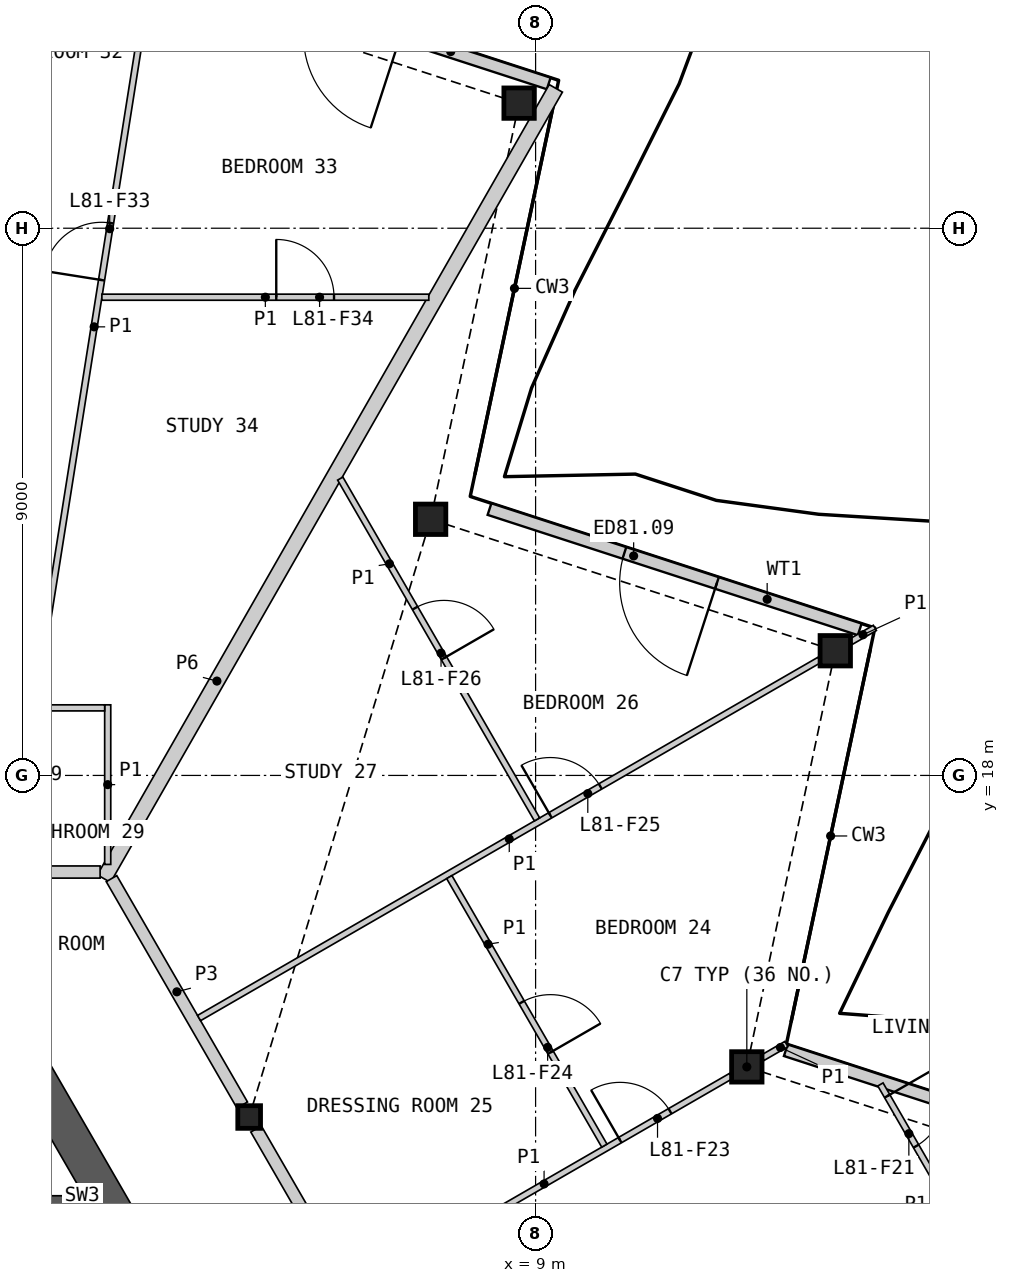
"""IFC4 building model, lengths in metres.
Left out: names, types, materials, properties, quantities, classifications, styles, units other than length and angle.
Written with IfcOpenShell. Run it as: python <this file> out.ifc"""

import sys

from ifc_helpers import new_model, si_unit, direction, frame, frame_2d, origin, origin_2d, place, context, subcontext, project, spatial, polyline, rectangle, hollow_rectangle, i_section, outline, extrude, element, fill, save


model = new_model("IFC4")
c1 = context("Model", 3, precision=1e-05, world=origin(), true_north=direction((0.0, 1.0)))
c2 = subcontext(c1, "Body", "Model", "MODEL_VIEW")
j1 = project(units=[si_unit("LENGTHUNIT", "METRE"), si_unit("PLANEANGLEUNIT", "RADIAN")], contexts=[c1])
p1 = place(None, origin())
s1 = spatial("IfcSite", under=j1, at=p1, CompositionType="ELEMENT")
p2 = place(p1, origin())
s2 = spatial("IfcBuilding", under=s1, at=p2, CompositionType="ELEMENT")
p3 = place(p2, frame((0.0, 0.0, 364.4)))
s3 = spatial("IfcBuildingStorey", under=s2, at=p3, CompositionType="ELEMENT", Elevation=364.4)
for number, where, z_axis, x_axis in (
    (1, (12.474, 13.206, 0.0), (0.0, 0.0, 1.0), (1.0, 0.0, 0.0)),
    (2, (13.929, 20.051, 0.0), (0.0, 0.0, 1.0), (1.0, 0.0, 0.0)),
    (3, (7.274, 22.213, 0.0), (0.0, 0.0, 1.0), (1.0, 0.0, 0.0)),
    (4, (8.729, 29.057, 0.0), (0.0, 0.0, 1.0), (1.0, 0.0, 0.0)),
):
    element("IfcColumn", number, at=place(p3, frame(where, z_axis=z_axis, x_axis=x_axis)), inside=s3, PredefinedType="COLUMN", context=c2, shape_type="SweptSolid", body=[
        extrude(hollow_rectangle(XDim=0.5, YDim=0.5, WallThickness=0.03, at=origin_2d()), origin(), (0.0, 0.0, 1.0), 3.4),
    ])
p4 = place(p3, frame((4.289, 12.382, 0.0), z_axis=(0.0, 0.0, 1.0), x_axis=(1.0, 0.0, 0.0)))
e5 = element("IfcColumn", 5, at=p4, inside=s3, PredefinedType="COLUMN", context=c2, shape_type="SweptSolid", body=[
    extrude(i_section(OverallWidth=0.374, OverallDepth=0.372, WebThickness=0.016, FlangeThickness=0.026, at=origin_2d()), origin(), (0.0, 0.0, 1.0), 3.4),
])
p5 = place(p3, frame((19.467, 11.416, 0.0), z_axis=(0.0, 0.0, 1.0), x_axis=(-0.951057706878, 0.309013330114, 0.0)))
e6 = element("IfcWall", 6, at=p5, inside=s3, PredefinedType="SOLIDWALL", context=c2, shape_type="SweptSolid", body=[
    extrude(rectangle(XDim=6.678, YDim=0.2, at=frame_2d((3.339, 0.0))), origin(), (0.0, 0.0, 1.0), 2.634),
])
p6 = place(p5, frame((2.402, 0.0, 0.0)))
e7 = element("IfcOpeningElement", 7, at=p6, cuts=e6, PredefinedType="OPENING", context=c2, shape_type="SweptSolid", body=[
    extrude(rectangle(XDim=1.6, YDim=2.25, at=frame_2d((0.8, 1.125))), frame((0.0, 0.11, 0.0), z_axis=(0.0, -1.0, 0.0), x_axis=(1.0, 0.0, 0.0)), (0.0, 0.0, 1.0), 0.22),
])
p7 = place(p3, frame((14.331, 20.402, 0.0), z_axis=(0.0, 0.0, 1.0), x_axis=(-0.951058447414, 0.30901105094, 0.0)))
e8 = element("IfcWall", 8, at=p7, inside=s3, PredefinedType="SOLIDWALL", context=c2, shape_type="SweptSolid", body=[
    extrude(rectangle(XDim=6.402, YDim=0.2, at=frame_2d((3.201, 0.0))), origin(), (0.0, 0.0, 1.0), 2.634),
])
p8 = place(p7, frame((2.469, 0.0, 0.0)))
e9 = element("IfcOpeningElement", 9, at=p8, cuts=e8, PredefinedType="OPENING", context=c2, shape_type="SweptSolid", body=[
    extrude(rectangle(XDim=1.6, YDim=2.25, at=frame_2d((0.8, 1.125))), frame((0.0, 0.11, 0.0), z_axis=(0.0, -1.0, 0.0), x_axis=(1.0, 0.0, 0.0)), (0.0, 0.0, 1.0), 0.22),
])
p9 = place(p3, frame((9.216, 29.381, 0.0), z_axis=(0.0, 0.0, 1.0), x_axis=(-0.951058150748, 0.309011964002, 0.0)))
e10 = element("IfcWall", 10, at=p9, inside=s3, PredefinedType="SOLIDWALL", context=c2, shape_type="SweptSolid", body=[
    extrude(rectangle(XDim=6.779, YDim=0.2, at=frame_2d((3.389, 0.0))), origin(), (0.0, 0.0, 1.0), 2.634),
])
p10 = place(p9, frame((2.559, 0.0, 0.0)))
e11 = element("IfcOpeningElement", 11, at=p10, cuts=e10, PredefinedType="OPENING", context=c2, shape_type="SweptSolid", body=[
    extrude(rectangle(XDim=1.6, YDim=2.25, at=frame_2d((0.8, 1.125))), frame((0.0, 0.11, 0.0), z_axis=(0.0, -1.0, 0.0), x_axis=(1.0, 0.0, 0.0)), (0.0, 0.0, 1.0), 0.22),
])
p11 = place(p3, origin())
e12 = element("IfcWall", 12, at=p11, inside=s3, PredefinedType="SHEAR", context=c2, shape_type="SweptSolid", body=[
    extrude(outline(polyline([(1.544, 5.237), (1.544, 11.087), (1.294, 10.837), (1.294, 5.237), (1.544, 5.237)])), origin(), (0.0, 0.0, 1.0), 3.1),
])
p12 = place(p3, origin())
e13 = element("IfcWall", 13, at=p12, inside=s3, PredefinedType="SHEAR", context=c2, shape_type="SweptSolid", body=[
    extrude(outline(polyline([(1.544, 11.087), (-1.544, 11.087), (-1.294, 10.837), (1.294, 10.837), (1.544, 11.087)])), origin(), (0.0, 0.0, 1.0), 3.1),
])
p13 = place(p3, frame((2.361, 10.322, 0.0), z_axis=(0.0, 0.0, 1.0), x_axis=(-0.500000735859, 0.866024978935, 0.0)))
e14 = element("IfcWall", 14, at=p13, inside=s3, PredefinedType="SHEAR", context=c2, shape_type="SweptSolid", body=[
    extrude(rectangle(XDim=4.202, YDim=0.6, at=frame_2d((2.101, 0.0))), origin(), (0.0, 0.0, 1.0), 3.1),
])
p14 = place(p3, frame((1.901, 16.302, 0.0), z_axis=(0.0, 0.0, 1.0), x_axis=(0.496368960053, 0.86811166073, 0.0)))
e15 = element("IfcWall", 15, at=p14, inside=s3, PredefinedType="PARTITIONING", context=c2, shape_type="SweptSolid", body=[
    extrude(rectangle(XDim=14.972, YDim=0.25, at=frame_2d((7.486, 0.0))), origin(), (0.0, 0.0, 1.0), 2.33),
])
p15 = place(p3, frame((4.403, 12.185, 0.0), z_axis=(0.0, 0.0, 1.0), x_axis=(0.499992155518, -0.866029932751, 0.0)))
e16 = element("IfcWall", 16, at=p15, inside=s3, PredefinedType="PARTITIONING", context=c2, shape_type="SweptSolid", body=[
    extrude(rectangle(XDim=8.123, YDim=0.2, at=frame_2d((4.062, 0.0))), origin(), (0.0, 0.0, 1.0), 3.1),
])
p16 = place(p15, frame((3.762, 0.0, 0.0)))
e17 = element("IfcOpeningElement", 17, at=p16, cuts=e16, PredefinedType="OPENING", context=c2, shape_type="SweptSolid", body=[
    extrude(rectangle(XDim=1.0, YDim=2.1, at=frame_2d((0.5, 1.05))), frame((0.0, 0.11, 0.0), z_axis=(0.0, -1.0, 0.0), x_axis=(1.0, 0.0, 0.0)), (0.0, 0.0, 1.0), 0.22),
])
p17 = place(p3, frame((2.025, 16.303, 0.0), z_axis=(0.0, 0.0, 1.0), x_axis=(0.500004215162, -0.866022970146, 0.0)))
e18 = element("IfcWall", 18, at=p17, inside=s3, PredefinedType="PARTITIONING", context=c2, shape_type="SweptSolid", body=[
    extrude(rectangle(XDim=4.3, YDim=0.2, at=frame_2d((2.15, 0.0))), origin(), (0.0, 0.0, 1.0), 3.1),
])
p18 = place(p3, frame((-1.863, 16.411, 0.0), z_axis=(0.0, 0.0, 1.0), x_axis=(1.0, 0.0, 0.0)))
e19 = element("IfcWall", 19, at=p18, inside=s3, PredefinedType="PARTITIONING", context=c2, shape_type="SweptSolid", body=[
    extrude(rectangle(XDim=3.701, YDim=0.2, at=frame_2d((1.851, 0.0))), origin(), (0.0, 0.0, 1.0), 3.1),
])
p19 = place(p18, frame((0.25, 0.0, 0.0)))
e20 = element("IfcOpeningElement", 20, at=p19, cuts=e19, PredefinedType="OPENING", context=c2, shape_type="SweptSolid", body=[
    extrude(rectangle(XDim=1.0, YDim=2.1, at=frame_2d((0.5, 1.05))), frame((0.0, 0.11, 0.0), z_axis=(0.0, -1.0, 0.0), x_axis=(1.0, 0.0, 0.0)), (0.0, 0.0, 1.0), 0.22),
])
p20 = place(p3, frame((8.775, 5.066, 0.0), z_axis=(0.0, 0.0, 1.0), x_axis=(0.866023724155, 0.500002909193, 0.0)))
e21 = element("IfcWall", 21, at=p20, inside=s3, PredefinedType="PARTITIONING", context=c2, shape_type="SweptSolid", body=[
    extrude(rectangle(XDim=11.655, YDim=0.2, at=frame_2d((5.827, 0.0))), origin(), (0.0, 0.0, 1.0), 2.33),
])
p21 = place(p3, frame((0.755, 19.16, 0.0), z_axis=(0.0, 0.0, 1.0), x_axis=(0.15643456532, 0.987688324712, 0.0)))
e22 = element("IfcWall", 22, at=p21, inside=s3, PredefinedType="PARTITIONING", context=c2, shape_type="SweptSolid", body=[
    extrude(rectangle(XDim=12.59, YDim=0.1, at=frame_2d((6.295, 0.0))), origin(), (0.0, 0.0, 1.0), 2.33),
])
p22 = place(p21, frame((7.074, 0.0, 0.0)))
e23 = element("IfcOpeningElement", 23, at=p22, cuts=e22, PredefinedType="OPENING", context=c2, shape_type="SweptSolid", body=[
    extrude(rectangle(XDim=0.95, YDim=2.1, at=frame_2d((0.475, 1.05))), frame((0.0, 0.06, 0.0), z_axis=(0.0, -1.0, 0.0), x_axis=(1.0, 0.0, 0.0)), (0.0, 0.0, 1.0), 0.12),
])
p23 = place(p3, frame((3.465, 14.01, 0.0), z_axis=(0.0, 0.0, 1.0), x_axis=(0.866032376801, 0.499987922186, 0.0)))
e24 = element("IfcWall", 24, at=p23, inside=s3, PredefinedType="PARTITIONING", context=c2, shape_type="SweptSolid", body=[
    extrude(rectangle(XDim=11.782, YDim=0.1, at=frame_2d((5.891, 0.0))), origin(), (0.0, 0.0, 1.0), 2.33),
])
p24 = place(p23, frame((6.67, 0.0, 0.0)))
e25 = element("IfcOpeningElement", 25, at=p24, cuts=e24, PredefinedType="OPENING", context=c2, shape_type="SweptSolid", body=[
    extrude(rectangle(XDim=0.95, YDim=2.1, at=frame_2d((0.475, 1.05))), frame((0.0, 0.06, 0.0), z_axis=(0.0, -1.0, 0.0), x_axis=(1.0, 0.0, 0.0)), (0.0, 0.0, 1.0), 0.12),
])
p25 = place(p3, frame((6.065, 9.506, 0.0), z_axis=(0.0, 0.0, 1.0), x_axis=(0.866018949465, 0.500011179042, 0.0)))
e26 = element("IfcWall", 26, at=p25, inside=s3, PredefinedType="PARTITIONING", context=c2, shape_type="SweptSolid", body=[
    extrude(rectangle(XDim=7.1, YDim=0.1, at=frame_2d((3.55, 0.0))), origin(), (0.0, 0.0, 1.0), 2.33),
])
p26 = place(p25, frame((4.992, 0.0, 0.0)))
e27 = element("IfcOpeningElement", 27, at=p26, cuts=e26, PredefinedType="OPENING", context=c2, shape_type="SweptSolid", body=[
    extrude(rectangle(XDim=0.95, YDim=2.1, at=frame_2d((0.475, 1.05))), frame((0.0, 0.06, 0.0), z_axis=(0.0, -1.0, 0.0), x_axis=(1.0, 0.0, 0.0)), (0.0, 0.0, 1.0), 0.12),
])
p27 = place(p3, frame((5.787, 22.882, 0.0), z_axis=(0.0, 0.0, 1.0), x_axis=(0.500001069878, -0.866024786089, 0.0)))
e28 = element("IfcWall", 28, at=p27, inside=s3, PredefinedType="PARTITIONING", context=c2, shape_type="SweptSolid", body=[
    extrude(rectangle(XDim=6.473, YDim=0.1, at=frame_2d((3.236, 0.0))), origin(), (0.0, 0.0, 1.0), 2.33),
])
p28 = place(p27, frame((2.46, 0.0, 0.0)))
e29 = element("IfcOpeningElement", 29, at=p28, cuts=e28, PredefinedType="OPENING", context=c2, shape_type="SweptSolid", body=[
    extrude(rectangle(XDim=0.95, YDim=2.1, at=frame_2d((0.475, 1.05))), frame((0.0, 0.06, 0.0), z_axis=(0.0, -1.0, 0.0), x_axis=(1.0, 0.0, 0.0)), (0.0, 0.0, 1.0), 0.12),
])
p29 = place(p3, frame((1.867, 25.865, 0.0), z_axis=(0.0, 0.0, 1.0), x_axis=(1.0, 0.0, 0.0)))
e30 = element("IfcWall", 30, at=p29, inside=s3, PredefinedType="PARTITIONING", context=c2, shape_type="SweptSolid", body=[
    extrude(rectangle(XDim=5.376, YDim=0.1, at=frame_2d((2.688, 0.0))), origin(), (0.0, 0.0, 1.0), 2.33),
])
p30 = place(p29, frame((2.868, 0.0, 0.0)))
e31 = element("IfcOpeningElement", 31, at=p30, cuts=e30, PredefinedType="OPENING", context=c2, shape_type="SweptSolid", body=[
    extrude(rectangle(XDim=0.95, YDim=2.1, at=frame_2d((0.475, 1.05))), frame((0.0, 0.06, 0.0), z_axis=(0.0, -1.0, 0.0), x_axis=(1.0, 0.0, 0.0)), (0.0, 0.0, 1.0), 0.12),
])
p31 = place(p3, frame((7.581, 16.328, 0.0), z_axis=(0.0, 0.0, 1.0), x_axis=(0.500005610874, -0.86602216432, 0.0)))
e32 = element("IfcWall", 32, at=p31, inside=s3, PredefinedType="PARTITIONING", context=c2, shape_type="SweptSolid", body=[
    extrude(rectangle(XDim=5.1, YDim=0.1, at=frame_2d((2.55, 0.0))), origin(), (0.0, 0.0, 1.0), 2.33),
])
p32 = place(p31, frame((2.379, 0.0, 0.0)))
e33 = element("IfcOpeningElement", 33, at=p32, cuts=e32, PredefinedType="OPENING", context=c2, shape_type="SweptSolid", body=[
    extrude(rectangle(XDim=0.95, YDim=2.1, at=frame_2d((0.475, 1.05))), frame((0.0, 0.06, 0.0), z_axis=(0.0, -1.0, 0.0), x_axis=(1.0, 0.0, 0.0)), (0.0, 0.0, 1.0), 0.12),
])
p33 = place(p3, frame((14.671, 12.918, 0.0), z_axis=(0.0, 0.0, 1.0), x_axis=(0.499981580887, -0.866036037803, 0.0)))
e34 = element("IfcWall", 34, at=p33, inside=s3, PredefinedType="PARTITIONING", context=c2, shape_type="SweptSolid", body=[
    extrude(rectangle(XDim=3.752, YDim=0.1, at=frame_2d((1.876, 0.0))), origin(), (0.0, 0.0, 1.0), 2.33),
])
p34 = place(p33, frame((0.222, 0.0, 0.0)))
e35 = element("IfcOpeningElement", 35, at=p34, cuts=e34, PredefinedType="OPENING", context=c2, shape_type="SweptSolid", body=[
    extrude(rectangle(XDim=0.95, YDim=2.1, at=frame_2d((0.475, 1.05))), frame((0.0, 0.06, 0.0), z_axis=(0.0, -1.0, 0.0), x_axis=(1.0, 0.0, 0.0)), (0.0, 0.0, 1.0), 0.12),
])
p35 = place(p3, frame((1.963, 16.536, 0.0), z_axis=(0.0, 0.0, 1.0), x_axis=(0.0, 1.0, 0.0)))
e36 = element("IfcWall", 36, at=p35, inside=s3, PredefinedType="PARTITIONING", context=c2, shape_type="SweptSolid", body=[
    extrude(rectangle(XDim=2.625, YDim=0.1, at=frame_2d((1.312, 0.0))), origin(), (0.0, 0.0, 1.0), 2.33),
])
p36 = place(p3, frame((-0.287, 19.111, 0.0), z_axis=(0.0, 0.0, 1.0), x_axis=(1.0, 0.0, 0.0)))
e37 = element("IfcWall", 37, at=p36, inside=s3, PredefinedType="PARTITIONING", context=c2, shape_type="SweptSolid", body=[
    extrude(rectangle(XDim=2.2, YDim=0.1, at=frame_2d((1.1, 0.0))), origin(), (0.0, 0.0, 1.0), 2.33),
])
for number, where, z_axis, x_axis in (
    (38, (14.189, 20.201, 0.0), (0.0, 0.0, 1.0), (0.866, 0.5, 0.0)),
    (39, (12.734, 13.356, 0.0), (0.0, 0.0, 1.0), (0.866, 0.5, 0.0)),
):
    element("IfcWall", number, at=place(p3, frame(where, z_axis=z_axis, x_axis=x_axis)), inside=s3, PredefinedType="PARTITIONING", context=c2, shape_type="SweptSolid", body=[
        extrude(rectangle(XDim=0.451, YDim=0.1, at=frame_2d((0.226, 0.0))), origin(), (0.0, 0.0, 1.0), 2.33),
    ])
p37 = place(p8, origin())
e40 = element("IfcDoor", 40, at=p37, inside=s3, OperationType="DOUBLE_DOOR_SINGLE_SWING", PredefinedType="DOOR", context=c2, shape_type="SweptSolid", body=[
    extrude(rectangle(XDim=1.6, YDim=2.25, at=frame_2d((0.8, 1.125))), frame((0.0, 0.025, 0.0), z_axis=(0.0, -1.0, 0.0), x_axis=(1.0, 0.0, 0.0)), (0.0, 0.0, 1.0), 0.05),
])
fill(e9, e40)
p38 = place(p34, origin())
e41 = element("IfcDoor", 41, at=p38, inside=s3, OperationType="SINGLE_SWING_LEFT", PredefinedType="DOOR", context=c2, shape_type="SweptSolid", body=[
    extrude(rectangle(XDim=0.95, YDim=2.1, at=frame_2d((0.475, 1.05))), frame((0.0, 0.025, 0.0), z_axis=(0.0, -1.0, 0.0), x_axis=(1.0, 0.0, 0.0)), (0.0, 0.0, 1.0), 0.05),
])
fill(e35, e41)
p39 = place(p26, origin())
e42 = element("IfcDoor", 42, at=p39, inside=s3, OperationType="SINGLE_SWING_LEFT", PredefinedType="DOOR", context=c2, shape_type="SweptSolid", body=[
    extrude(rectangle(XDim=0.95, YDim=2.1, at=frame_2d((0.475, 1.05))), frame((0.0, 0.025, 0.0), z_axis=(0.0, -1.0, 0.0), x_axis=(1.0, 0.0, 0.0)), (0.0, 0.0, 1.0), 0.05),
])
fill(e27, e42)
p40 = place(p32, origin())
e43 = element("IfcDoor", 43, at=p40, inside=s3, OperationType="SINGLE_SWING_RIGHT", PredefinedType="DOOR", context=c2, shape_type="SweptSolid", body=[
    extrude(rectangle(XDim=0.95, YDim=2.1, at=frame_2d((0.475, 1.05))), frame((0.0, 0.025, 0.0), z_axis=(0.0, -1.0, 0.0), x_axis=(1.0, 0.0, 0.0)), (0.0, 0.0, 1.0), 0.05),
])
fill(e33, e43)
p41 = place(p24, origin())
e44 = element("IfcDoor", 44, at=p41, inside=s3, OperationType="SINGLE_SWING_LEFT", PredefinedType="DOOR", context=c2, shape_type="SweptSolid", body=[
    extrude(rectangle(XDim=0.95, YDim=2.1, at=frame_2d((0.475, 1.05))), frame((0.0, 0.025, 0.0), z_axis=(0.0, -1.0, 0.0), x_axis=(1.0, 0.0, 0.0)), (0.0, 0.0, 1.0), 0.05),
])
fill(e25, e44)
p42 = place(p28, origin())
e45 = element("IfcDoor", 45, at=p42, inside=s3, OperationType="SINGLE_SWING_RIGHT", PredefinedType="DOOR", context=c2, shape_type="SweptSolid", body=[
    extrude(rectangle(XDim=0.95, YDim=2.1, at=frame_2d((0.475, 1.05))), frame((0.0, 0.025, 0.0), z_axis=(0.0, -1.0, 0.0), x_axis=(1.0, 0.0, 0.0)), (0.0, 0.0, 1.0), 0.05),
])
fill(e29, e45)
p43 = place(p22, origin())
e46 = element("IfcDoor", 46, at=p43, inside=s3, OperationType="SINGLE_SWING_LEFT", PredefinedType="DOOR", context=c2, shape_type="SweptSolid", body=[
    extrude(rectangle(XDim=0.95, YDim=2.1, at=frame_2d((0.475, 1.05))), frame((0.0, 0.025, 0.0), z_axis=(0.0, -1.0, 0.0), x_axis=(1.0, 0.0, 0.0)), (0.0, 0.0, 1.0), 0.05),
])
fill(e23, e46)
p44 = place(p30, origin())
e47 = element("IfcDoor", 47, at=p44, inside=s3, OperationType="SINGLE_SWING_LEFT", PredefinedType="DOOR", context=c2, shape_type="SweptSolid", body=[
    extrude(rectangle(XDim=0.95, YDim=2.1, at=frame_2d((0.475, 1.05))), frame((0.0, 0.025, 0.0), z_axis=(0.0, -1.0, 0.0), x_axis=(1.0, 0.0, 0.0)), (0.0, 0.0, 1.0), 0.05),
])
fill(e31, e47)
save(model, sys.argv[1])
